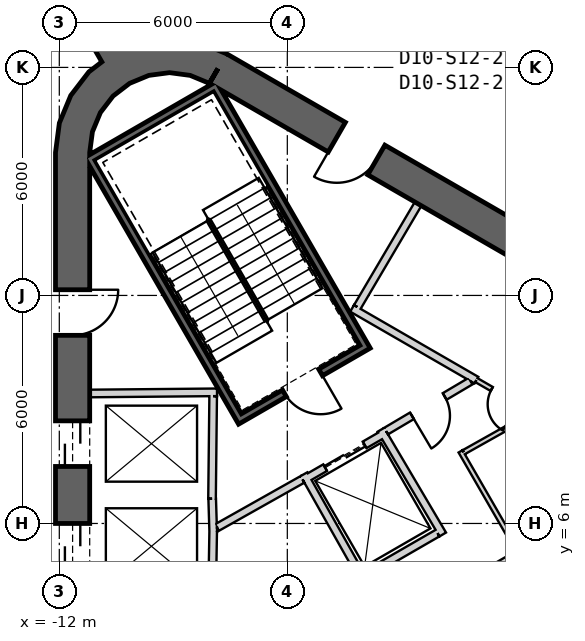
"""IFC4 building model, lengths in metres.
Left out: names, types, materials, properties, quantities, classifications, styles, units other than length and angle.
Written with IfcOpenShell. Run it as: python <this file> out.ifc"""

import sys

from ifc_helpers import new_model, si_unit, direction, frame, frame_2d, origin, place, context, subcontext, project, spatial, polyline, rectangle, outline, extrude, element, fill, save


model = new_model("IFC4")
c1 = context("Model", 3, precision=1e-05, world=origin(), true_north=direction((0.0, 1.0)))
c2 = subcontext(c1, "Body", "Model", "MODEL_VIEW")
j1 = project(units=[si_unit("LENGTHUNIT", "METRE"), si_unit("PLANEANGLEUNIT", "RADIAN")], contexts=[c1])
p1 = place(None, origin())
s1 = spatial("IfcSite", under=j1, at=p1, CompositionType="ELEMENT")
p2 = place(p1, origin())
s2 = spatial("IfcBuilding", under=s1, at=p2, CompositionType="ELEMENT")
p3 = place(p2, frame((0.0, 0.0, 205.2)))
s3 = spatial("IfcBuildingStorey", under=s2, at=p3, CompositionType="ELEMENT", Elevation=205.2)
p4 = place(p3, frame((19.475, 2.208, 0.0), z_axis=(0.0, 0.0, 1.0), x_axis=(-0.866028369851, 0.499994862586, 0.0)))
e1 = element("IfcWall", 1, at=p4, inside=s3, PredefinedType="SHEAR", context=c2, shape_type="SweptSolid", body=[
    extrude(rectangle(XDim=31.523, YDim=0.9, at=frame_2d((15.762, 0.0))), origin(), (0.0, 0.0, 1.0), 4.0),
])
p5 = place(p4, frame((7.062, 0.0, 0.0)))
e2 = element("IfcOpeningElement", 2, at=p5, cuts=e1, PredefinedType="OPENING", context=c2, shape_type="SweptSolid", body=[
    extrude(rectangle(XDim=1.2, YDim=2.4, at=frame_2d((0.6, 1.2))), frame((0.0, 0.46, 0.0), z_axis=(0.0, -1.0, 0.0), x_axis=(1.0, 0.0, 0.0)), (0.0, 0.0, 1.0), 0.92),
])
p6 = place(p4, frame((3.612, 0.0, 0.0)))
e3 = element("IfcOpeningElement", 3, at=p6, cuts=e1, PredefinedType="OPENING", context=c2, shape_type="SweptSolid", body=[
    extrude(rectangle(XDim=1.2, YDim=2.4, at=frame_2d((0.6, 1.2))), frame((0.0, 0.46, 0.0), z_axis=(0.0, -1.0, 0.0), x_axis=(1.0, 0.0, 0.0)), (0.0, 0.0, 1.0), 0.92),
])
p7 = place(p4, frame((26.712, 0.0, 0.0)))
e4 = element("IfcOpeningElement", 4, at=p7, cuts=e1, PredefinedType="OPENING", context=c2, shape_type="SweptSolid", body=[
    extrude(rectangle(XDim=1.2, YDim=2.4, at=frame_2d((0.6, 1.2))), frame((0.0, 0.46, 0.0), z_axis=(0.0, -1.0, 0.0), x_axis=(1.0, 0.0, 0.0)), (0.0, 0.0, 1.0), 0.92),
])
p8 = place(p3, frame((-11.65, 15.762, 0.0), z_axis=(0.0, 0.0, 1.0), x_axis=(0.0, -1.0, 0.0)))
e5 = element("IfcWall", 5, at=p8, inside=s3, PredefinedType="SHEAR", context=c2, shape_type="SweptSolid", body=[
    extrude(rectangle(XDim=31.523, YDim=0.9, at=frame_2d((15.762, 0.0))), origin(), (0.0, 0.0, 1.0), 4.0),
])
p9 = place(p8, frame((7.062, 0.0, 0.0)))
e6 = element("IfcOpeningElement", 6, at=p9, cuts=e5, PredefinedType="OPENING", context=c2, shape_type="SweptSolid", body=[
    extrude(rectangle(XDim=1.2, YDim=2.4, at=frame_2d((0.6, 1.2))), frame((0.0, 0.46, 0.0), z_axis=(0.0, -1.0, 0.0), x_axis=(1.0, 0.0, 0.0)), (0.0, 0.0, 1.0), 0.92),
])
p10 = place(p8, frame((9.762, 0.0, 0.0)))
e7 = element("IfcOpeningElement", 7, at=p10, cuts=e5, PredefinedType="OPENING", context=c2, shape_type="SweptSolid", body=[
    extrude(rectangle(XDim=1.2, YDim=2.4, at=frame_2d((0.6, 1.2))), frame((0.0, 0.46, 0.0), z_axis=(0.0, -1.0, 0.0), x_axis=(1.0, 0.0, 0.0)), (0.0, 0.0, 1.0), 0.92),
])
p11 = place(p8, frame((12.462, 0.0, 0.0)))
e8 = element("IfcOpeningElement", 8, at=p11, cuts=e5, PredefinedType="OPENING", context=c2, shape_type="SweptSolid", body=[
    extrude(rectangle(XDim=1.2, YDim=2.4, at=frame_2d((0.6, 1.2))), frame((0.0, 0.46, 0.0), z_axis=(0.0, -1.0, 0.0), x_axis=(1.0, 0.0, 0.0)), (0.0, 0.0, 1.0), 0.92),
])
p12 = place(p8, frame((15.162, 0.0, 0.0)))
e9 = element("IfcOpeningElement", 9, at=p12, cuts=e5, PredefinedType="OPENING", context=c2, shape_type="SweptSolid", body=[
    extrude(rectangle(XDim=1.2, YDim=2.4, at=frame_2d((0.6, 1.2))), frame((0.0, 0.46, 0.0), z_axis=(0.0, -1.0, 0.0), x_axis=(1.0, 0.0, 0.0)), (0.0, 0.0, 1.0), 0.92),
])
p13 = place(p8, frame((17.862, 0.0, 0.0)))
e10 = element("IfcOpeningElement", 10, at=p13, cuts=e5, PredefinedType="OPENING", context=c2, shape_type="SweptSolid", body=[
    extrude(rectangle(XDim=1.2, YDim=2.4, at=frame_2d((0.6, 1.2))), frame((0.0, 0.46, 0.0), z_axis=(0.0, -1.0, 0.0), x_axis=(1.0, 0.0, 0.0)), (0.0, 0.0, 1.0), 0.92),
])
p14 = place(p8, frame((20.562, 0.0, 0.0)))
e11 = element("IfcOpeningElement", 11, at=p14, cuts=e5, PredefinedType="OPENING", context=c2, shape_type="SweptSolid", body=[
    extrude(rectangle(XDim=1.2, YDim=2.4, at=frame_2d((0.6, 1.2))), frame((0.0, 0.46, 0.0), z_axis=(0.0, -1.0, 0.0), x_axis=(1.0, 0.0, 0.0)), (0.0, 0.0, 1.0), 0.92),
])
p15 = place(p8, frame((23.262, 0.0, 0.0)))
e12 = element("IfcOpeningElement", 12, at=p15, cuts=e5, PredefinedType="OPENING", context=c2, shape_type="SweptSolid", body=[
    extrude(rectangle(XDim=1.2, YDim=2.4, at=frame_2d((0.6, 1.2))), frame((0.0, 0.46, 0.0), z_axis=(0.0, -1.0, 0.0), x_axis=(1.0, 0.0, 0.0)), (0.0, 0.0, 1.0), 0.92),
])
p16 = place(p8, frame((3.612, 0.0, 0.0)))
e13 = element("IfcOpeningElement", 13, at=p16, cuts=e5, PredefinedType="OPENING", context=c2, shape_type="SweptSolid", body=[
    extrude(rectangle(XDim=1.2, YDim=2.4, at=frame_2d((0.6, 1.2))), frame((0.0, 0.46, 0.0), z_axis=(0.0, -1.0, 0.0), x_axis=(1.0, 0.0, 0.0)), (0.0, 0.0, 1.0), 0.92),
])
p17 = place(p8, frame((26.712, 0.0, 0.0)))
e14 = element("IfcOpeningElement", 14, at=p17, cuts=e5, PredefinedType="OPENING", context=c2, shape_type="SweptSolid", body=[
    extrude(rectangle(XDim=1.2, YDim=2.4, at=frame_2d((0.6, 1.2))), frame((0.0, 0.46, 0.0), z_axis=(0.0, -1.0, 0.0), x_axis=(1.0, 0.0, 0.0)), (0.0, 0.0, 1.0), 0.92),
])
p18 = place(p3, origin())
e15 = element("IfcWall", 15, at=p18, inside=s3, PredefinedType="SHEAR", context=c2, shape_type="SweptSolid", body=[
    extrude(outline(polyline([(-7.6, 18.36), (-8.323, 18.659), (-9.1, 18.762), (-9.876, 18.659), (-10.6, 18.36), (-11.221, 17.883), (-11.698, 17.262), (-11.998, 16.538), (-12.1, 15.762), (-11.2, 15.762), (-11.128, 16.305), (-10.919, 16.812), (-10.585, 17.247), (-10.15, 17.58), (-9.644, 17.79), (-9.1, 17.862), (-8.556, 17.79), (-8.05, 17.58), (-7.6, 18.36)])), origin(), (0.0, 0.0, 1.0), 4.0),
])
p19 = place(p3, frame((-10.575, 18.316, 0.0), z_axis=(0.0, 0.0, 1.0), x_axis=(-0.499999598486, 0.866025635599, 0.0)))
e16 = element("IfcWall", 16, at=p19, inside=s3, PredefinedType="SHEAR", context=c2, shape_type="SweptSolid", body=[
    extrude(rectangle(XDim=11.794, YDim=0.7, at=frame_2d((5.897, 0.0))), origin(), (0.0, 0.0, 1.0), 4.0),
])
p20 = place(p3, frame((-11.2, 9.42, 0.0), z_axis=(0.0, 0.0, 1.0), x_axis=(0.999957167047, 0.009255488683, 0.0)))
e17 = element("IfcWall", 17, at=p20, inside=s3, PredefinedType="PLUMBINGWALL", context=c2, shape_type="SweptSolid", body=[
    extrude(rectangle(XDim=3.35, YDim=0.2, at=frame_2d((1.675, 0.0))), origin(), (0.0, 0.0, 1.0), 3.7),
])
p21 = place(p3, frame((-7.951, 9.35, 0.0), z_axis=(0.0, 0.0, 1.0), x_axis=(-0.011120469654, -0.999938165666, 0.0)))
e18 = element("IfcWall", 18, at=p21, inside=s3, PredefinedType="PLUMBINGWALL", context=c2, shape_type="SweptSolid", body=[
    extrude(rectangle(XDim=2.7, YDim=0.2, at=frame_2d((1.35, 0.0))), origin(), (0.0, 0.0, 1.0), 3.7),
])
p22 = place(p3, frame((-7.977, 6.65, 0.0), z_axis=(0.0, 0.0, 1.0), x_axis=(0.030861509705, -0.999523670164, 0.0)))
e19 = element("IfcWall", 19, at=p22, inside=s3, PredefinedType="PLUMBINGWALL", context=c2, shape_type="SweptSolid", body=[
    extrude(rectangle(XDim=0.878, YDim=0.2, at=frame_2d((0.439, 0.0))), origin(), (0.0, 0.0, 1.0), 3.7),
])
p23 = place(p3, frame((-7.949, 5.894, 0.0), z_axis=(0.0, 0.0, 1.0), x_axis=(-0.016809909365, -0.999858703491, 0.0)))
e20 = element("IfcWall", 20, at=p23, inside=s3, PredefinedType="PLUMBINGWALL", context=c2, shape_type="SweptSolid", body=[
    extrude(rectangle(XDim=1.844, YDim=0.2, at=frame_2d((0.922, 0.0))), origin(), (0.0, 0.0, 1.0), 3.7),
])
p24 = place(p3, frame((-11.245, 15.678, -0.3), z_axis=(0.0, 0.0, 1.0), x_axis=(0.499977274689, -0.866038523851, 0.0)))
e21 = element("IfcWall", 21, at=p24, inside=s3, PredefinedType="SHEAR", context=c2, shape_type="SweptSolid", body=[
    extrude(rectangle(XDim=8.1, YDim=0.2, at=frame_2d((4.05, 0.0))), origin(), (0.0, 0.0, 1.0), 4.0),
])
p25 = place(p3, frame((-7.818, 17.541, -0.3), z_axis=(0.0, 0.0, 1.0), x_axis=(-0.866044365799, -0.499967155389, 0.0)))
e22 = element("IfcWall", 22, at=p25, inside=s3, PredefinedType="SHEAR", context=c2, shape_type="SweptSolid", body=[
    extrude(rectangle(XDim=3.8, YDim=0.2, at=frame_2d((1.9, 0.0))), origin(), (0.0, 0.0, 1.0), 4.0),
])
p26 = place(p3, frame((-7.854, 17.405, -0.3), z_axis=(0.0, 0.0, 1.0), x_axis=(0.499997992926, -0.866026562566, 0.0)))
e23 = element("IfcWall", 23, at=p26, inside=s3, PredefinedType="SHEAR", context=c2, shape_type="SweptSolid", body=[
    extrude(rectangle(XDim=7.9, YDim=0.2, at=frame_2d((3.95, 0.0))), origin(), (0.0, 0.0, 1.0), 4.0),
])
p27 = place(p3, frame((-7.159, 8.8, -0.3), z_axis=(0.0, 0.0, 1.0), x_axis=(0.866047807691, 0.499961193289, 0.0)))
e24 = element("IfcWall", 24, at=p27, inside=s3, PredefinedType="SHEAR", context=c2, shape_type="SweptSolid", body=[
    extrude(rectangle(XDim=3.6, YDim=0.2, at=frame_2d((1.8, 0.0))), origin(), (0.0, 0.0, 1.0), 4.0),
])
p28 = place(p27, frame((1.25, 0.0, 0.3)))
e25 = element("IfcOpeningElement", 25, at=p28, cuts=e24, PredefinedType="OPENING", context=c2, shape_type="SweptSolid", body=[
    extrude(rectangle(XDim=1.1, YDim=2.1, at=frame_2d((0.55, 1.05))), frame((0.0, 0.11, 0.0), z_axis=(0.0, -1.0, 0.0), x_axis=(1.0, 0.0, 0.0)), (0.0, 0.0, 1.0), 0.22),
])
p29 = place(p3, frame((-5.524, 7.168, 0.0), z_axis=(0.0, 0.0, 1.0), x_axis=(0.866024647952, 0.500001309137, 0.0)))
e26 = element("IfcWall", 26, at=p29, inside=s3, PredefinedType="PLUMBINGWALL", context=c2, shape_type="SweptSolid", body=[
    extrude(rectangle(XDim=2.4, YDim=0.2, at=frame_2d((1.2, 0.0))), origin(), (0.0, 0.0, 1.0), 3.7),
])
p30 = place(p29, frame((0.6, 0.0, 0.0)))
e27 = element("IfcOpeningElement", 27, at=p30, cuts=e26, PredefinedType="OPENING", context=c2, shape_type="SweptSolid", body=[
    extrude(rectangle(XDim=1.2, YDim=2.4, at=frame_2d((0.6, 1.2))), frame((0.0, 0.11, 0.0), z_axis=(0.0, -1.0, 0.0), x_axis=(1.0, 0.0, 0.0)), (0.0, 0.0, 1.0), 0.22),
])
p31 = place(p3, frame((-4.039, 4.596, 0.0), z_axis=(0.0, 0.0, 1.0), x_axis=(-0.491322718731, 0.870977603649, 0.0)))
e28 = element("IfcWall", 28, at=p31, inside=s3, PredefinedType="PLUMBINGWALL", context=c2, shape_type="SweptSolid", body=[
    extrude(rectangle(XDim=3.1, YDim=0.2, at=frame_2d((1.55, 0.0))), origin(), (0.0, 0.0, 1.0), 3.7),
])
p32 = place(p3, frame((-3.538, 8.465, 0.0), z_axis=(0.0, 0.0, 1.0), x_axis=(0.508616218331, -0.860993346345, 0.0)))
e29 = element("IfcWall", 29, at=p32, inside=s3, PredefinedType="PLUMBINGWALL", context=c2, shape_type="SweptSolid", body=[
    extrude(rectangle(XDim=3.2, YDim=0.2, at=frame_2d((1.6, 0.0))), origin(), (0.0, 0.0, 1.0), 3.7),
])
p33 = place(p3, frame((-2.047, 5.746, 0.0), z_axis=(0.0, 0.0, 1.0), x_axis=(-0.866019606374, -0.500010041276, 0.0)))
e30 = element("IfcWall", 30, at=p33, inside=s3, PredefinedType="PLUMBINGWALL", context=c2, shape_type="SweptSolid", body=[
    extrude(rectangle(XDim=2.205, YDim=0.2, at=frame_2d((1.102, 0.0))), origin(), (0.0, 0.0, 1.0), 3.7),
])
p34 = place(p3, frame((-1.024, 9.771, 0.0), z_axis=(0.0, 0.0, 1.0), x_axis=(0.866039397417, -0.499975761534, 0.0)))
e31 = element("IfcWall", 31, at=p34, inside=s3, PredefinedType="PARTITIONING", context=c2, shape_type="SweptSolid", body=[
    extrude(rectangle(XDim=1.752, YDim=0.12, at=frame_2d((0.876, 0.0))), origin(), (0.0, 0.0, 1.0), 3.7),
])
p35 = place(p34, frame((0.466, 0.0, 0.0)))
e32 = element("IfcOpeningElement", 32, at=p35, cuts=e31, PredefinedType="OPENING", context=c2, shape_type="SweptSolid", body=[
    extrude(rectangle(XDim=0.8, YDim=2.1, at=frame_2d((0.4, 1.05))), frame((0.0, 0.07, 0.0), z_axis=(0.0, -1.0, 0.0), x_axis=(1.0, 0.0, 0.0)), (0.0, 0.0, 1.0), 0.14),
])
p36 = place(p3, frame((-4.296, 11.66, 0.0), z_axis=(0.0, 0.0, 1.0), x_axis=(0.866027389382, -0.499996560828, 0.0)))
e33 = element("IfcWall", 33, at=p36, inside=s3, PredefinedType="PARTITIONING", context=c2, shape_type="SweptSolid", body=[
    extrude(rectangle(XDim=3.778, YDim=0.2, at=frame_2d((1.889, 0.0))), origin(), (0.0, 0.0, 1.0), 3.7),
])
p37 = place(p3, frame((-2.558, 14.409, 0.0), z_axis=(0.0, 0.0, 1.0), x_axis=(-0.508018930956, -0.861345903683, 0.0)))
e34 = element("IfcWall", 34, at=p37, inside=s3, PredefinedType="PARTITIONING", context=c2, shape_type="SweptSolid", body=[
    extrude(rectangle(XDim=3.15, YDim=0.2, at=frame_2d((1.575, 0.0))), origin(), (0.0, 0.0, 1.0), 3.7),
])
p38 = place(p3, frame((-5.6, 7.16, 0.0), z_axis=(0.0, 0.0, 1.0), x_axis=(-0.871340486379, -0.490678873396, 0.0)))
e35 = element("IfcWall", 35, at=p38, inside=s3, PredefinedType="PARTITIONING", context=c2, shape_type="SweptSolid", body=[
    extrude(rectangle(XDim=2.581, YDim=0.2, at=frame_2d((1.291, 0.0))), origin(), (0.0, 0.0, 1.0), 3.7),
])
p39 = place(p3, frame((-1.179, 9.745, 0.0), z_axis=(0.0, 0.0, 1.0), x_axis=(-0.860630814782, -0.509229418482, 0.0)))
e36 = element("IfcWall", 36, at=p39, inside=s3, PredefinedType="PARTITIONING", context=c2, shape_type="SweptSolid", body=[
    extrude(rectangle(XDim=2.582, YDim=0.2, at=frame_2d((1.291, 0.0))), origin(), (0.0, 0.0, 1.0), 3.7),
])
p40 = place(p39, frame((0.791, 0.0, 0.0)))
e37 = element("IfcOpeningElement", 37, at=p40, cuts=e36, PredefinedType="OPENING", context=c2, shape_type="SweptSolid", body=[
    extrude(rectangle(XDim=1.0, YDim=2.1, at=frame_2d((0.5, 1.05))), frame((0.0, 0.11, 0.0), z_axis=(0.0, -1.0, 0.0), x_axis=(1.0, 0.0, 0.0)), (0.0, 0.0, 1.0), 0.22),
])
p41 = place(p3, frame((0.14, 5.277, 0.0), z_axis=(0.0, 0.0, 1.0), x_axis=(-0.865989465428, -0.500062241894, 0.0)))
e38 = element("IfcWall", 38, at=p41, inside=s3, PredefinedType="PARTITIONING", context=c2, shape_type="SweptSolid", body=[
    extrude(rectangle(XDim=1.7, YDim=0.12, at=frame_2d((0.85, 0.0))), origin(), (0.0, 0.0, 1.0), 3.7),
])
p42 = place(p3, frame((-1.442, 7.897, 0.0), z_axis=(0.0, 0.0, 1.0), x_axis=(0.499990139034, -0.866031096941, 0.0)))
e39 = element("IfcWall", 39, at=p42, inside=s3, PredefinedType="PARTITIONING", context=c2, shape_type="SweptSolid", body=[
    extrude(rectangle(XDim=3.0, YDim=0.12, at=frame_2d((1.5, 0.0))), origin(), (0.0, 0.0, 1.0), 3.7),
])
p43 = place(p3, frame((0.414, 8.871, 0.0), z_axis=(0.0, 0.0, 1.0), x_axis=(-0.871809386997, -0.48984527429, 0.0)))
e40 = element("IfcWall", 40, at=p43, inside=s3, PredefinedType="PARTITIONING", context=c2, shape_type="SweptSolid", body=[
    extrude(rectangle(XDim=2.034, YDim=0.12, at=frame_2d((1.017, 0.0))), origin(), (0.0, 0.0, 1.0), 3.7),
])
p44 = place(p28, origin())
e41 = element("IfcDoor", 41, at=p44, inside=s3, OperationType="SINGLE_SWING_LEFT", PredefinedType="USERDEFINED", context=c2, shape_type="SweptSolid", body=[
    extrude(rectangle(XDim=1.1, YDim=2.1, at=frame_2d((0.55, 1.05))), frame((0.0, 0.025, 0.0), z_axis=(0.0, -1.0, 0.0), x_axis=(1.0, 0.0, 0.0)), (0.0, 0.0, 1.0), 0.05),
])
fill(e25, e41)
p45 = place(p40, origin())
e42 = element("IfcDoor", 42, at=p45, inside=s3, OperationType="SINGLE_SWING_RIGHT", PredefinedType="USERDEFINED", context=c2, shape_type="SweptSolid", body=[
    extrude(rectangle(XDim=1.0, YDim=2.1, at=frame_2d((0.5, 1.05))), frame((0.0, 0.025, 0.0), z_axis=(0.0, -1.0, 0.0), x_axis=(1.0, 0.0, 0.0)), (0.0, 0.0, 1.0), 0.05),
])
fill(e37, e42)
p46 = place(p30, origin())
e43 = element("IfcDoor", 43, at=p46, inside=s3, OperationType="SLIDING_TO_LEFT", PredefinedType="USERDEFINED", context=c2, shape_type="SweptSolid", body=[
    extrude(rectangle(XDim=1.2, YDim=2.4, at=frame_2d((0.6, 1.2))), frame((0.0, 0.025, 0.0), z_axis=(0.0, -1.0, 0.0), x_axis=(1.0, 0.0, 0.0)), (0.0, 0.0, 1.0), 0.05),
])
fill(e27, e43)
p47 = place(p35, origin())
e44 = element("IfcDoor", 44, at=p47, inside=s3, OperationType="SINGLE_SWING_RIGHT", PredefinedType="USERDEFINED", context=c2, shape_type="SweptSolid", body=[
    extrude(rectangle(XDim=0.8, YDim=2.1, at=frame_2d((0.4, 1.05))), frame((0.0, 0.025, 0.0), z_axis=(0.0, -1.0, 0.0), x_axis=(1.0, 0.0, 0.0)), (0.0, 0.0, 1.0), 0.05),
])
fill(e32, e44)
p48 = place(p9, origin())
e45 = element("IfcDoor", 45, at=p48, inside=s3, OperationType="SLIDING_TO_LEFT", PredefinedType="USERDEFINED", context=c2, shape_type="SweptSolid", body=[
    extrude(rectangle(XDim=1.2, YDim=2.4, at=frame_2d((0.6, 1.2))), frame((0.0, 0.025, 0.0), z_axis=(0.0, -1.0, 0.0), x_axis=(1.0, 0.0, 0.0)), (0.0, 0.0, 1.0), 0.05),
])
fill(e6, e45)
p49 = place(p10, origin())
e46 = element("IfcDoor", 46, at=p49, inside=s3, OperationType="SLIDING_TO_LEFT", PredefinedType="USERDEFINED", context=c2, shape_type="SweptSolid", body=[
    extrude(rectangle(XDim=1.2, YDim=2.4, at=frame_2d((0.6, 1.2))), frame((0.0, 0.025, 0.0), z_axis=(0.0, -1.0, 0.0), x_axis=(1.0, 0.0, 0.0)), (0.0, 0.0, 1.0), 0.05),
])
fill(e7, e46)
p50 = place(p7, origin())
e47 = element("IfcDoor", 47, at=p50, inside=s3, OperationType="SINGLE_SWING_RIGHT", PredefinedType="USERDEFINED", context=c2, shape_type="SweptSolid", body=[
    extrude(rectangle(XDim=1.2, YDim=2.4, at=frame_2d((0.6, 1.2))), frame((0.0, 0.025, 0.0), z_axis=(0.0, -1.0, 0.0), x_axis=(1.0, 0.0, 0.0)), (0.0, 0.0, 1.0), 0.05),
])
fill(e4, e47)
p51 = place(p16, origin())
e48 = element("IfcDoor", 48, at=p51, inside=s3, OperationType="SINGLE_SWING_LEFT", PredefinedType="USERDEFINED", context=c2, shape_type="SweptSolid", body=[
    extrude(rectangle(XDim=1.2, YDim=2.4, at=frame_2d((0.6, 1.2))), frame((0.0, 0.025, 0.0), z_axis=(0.0, -1.0, 0.0), x_axis=(1.0, 0.0, 0.0)), (0.0, 0.0, 1.0), 0.05),
])
fill(e13, e48)
save(model, sys.argv[1])
